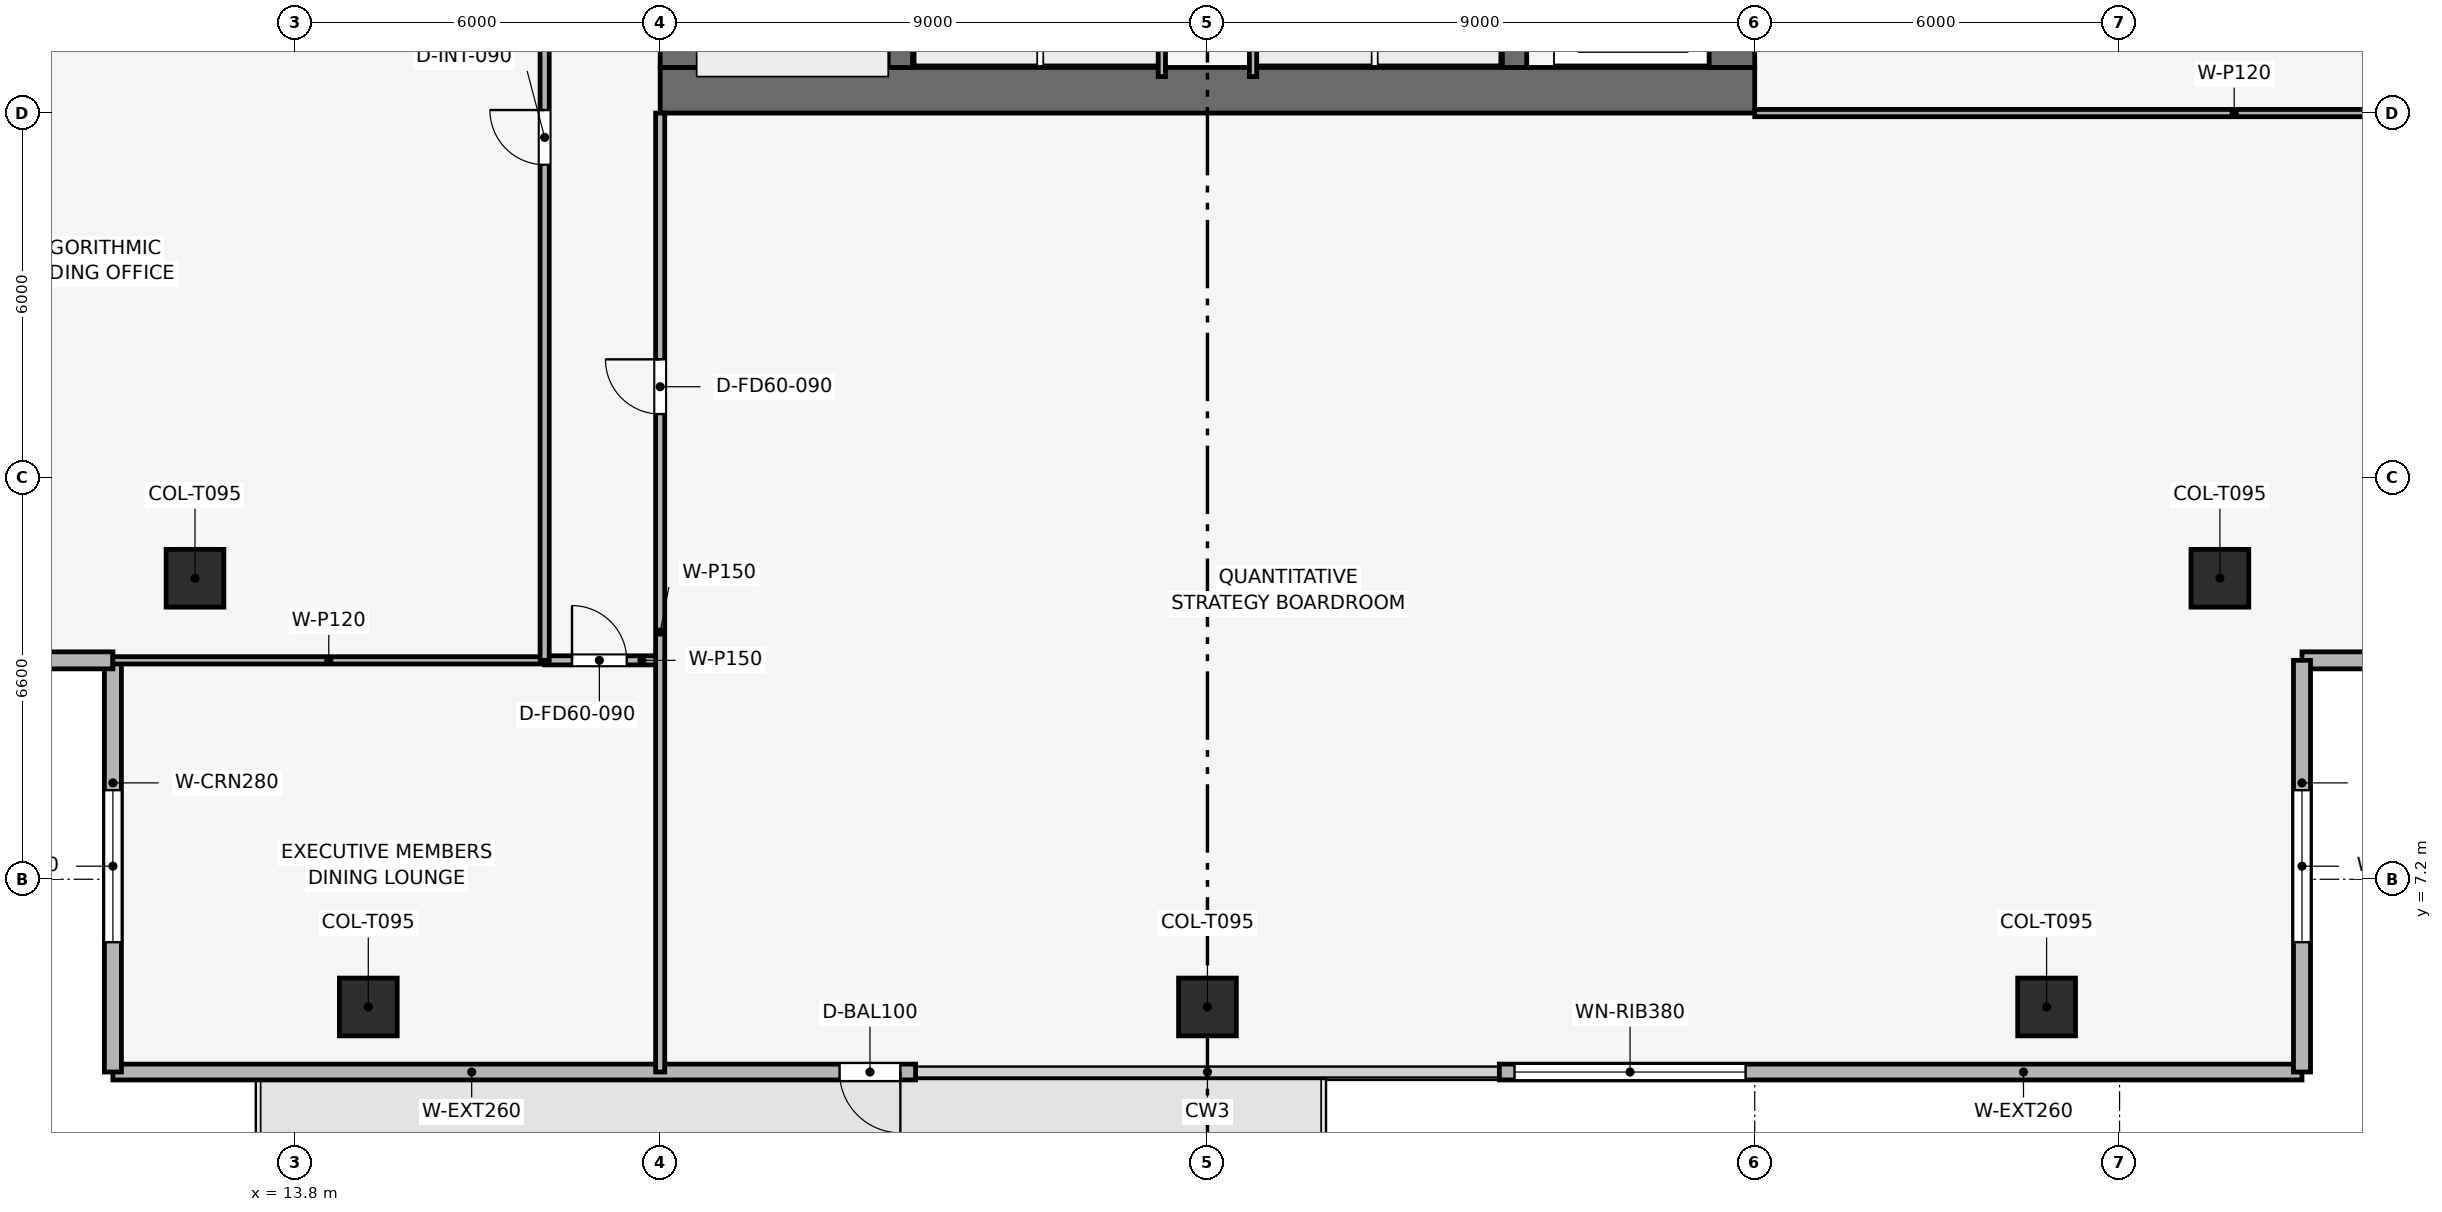
"""IFC4 building model, lengths in metres.
Left out: names, types, materials, properties, quantities, classifications, styles, units other than length and angle.
Written with IfcOpenShell. Run it as: python <this file> out.ifc"""

import sys

from ifc_helpers import new_model, si_unit, direction, frame, frame_2d, origin, origin_2d, place, context, subcontext, project, spatial, rectangle, extrude, element, fill, save


model = new_model("IFC4")
c1 = context("Model", 3, precision=1e-05, world=origin(), true_north=direction((0.0, 1.0)))
c2 = subcontext(c1, "Body", "Model", "MODEL_VIEW")
j1 = project(units=[si_unit("LENGTHUNIT", "METRE"), si_unit("PLANEANGLEUNIT", "RADIAN")], contexts=[c1])
p1 = place(None, origin())
s1 = spatial("IfcSite", under=j1, at=p1, CompositionType="ELEMENT")
p2 = place(p1, origin())
s2 = spatial("IfcBuilding", under=s1, at=p2, CompositionType="ELEMENT")
p3 = place(p2, frame((0.0, 0.0, 276.6)))
s3 = spatial("IfcBuildingStorey", under=s2, at=p3, CompositionType="ELEMENT", Elevation=276.6)
p4 = place(p3, frame((19.8, 20.175, 0.0), z_axis=(0.0, 0.0, 1.0), x_axis=(1.0, 0.0, 0.0)))
e1 = element("IfcWall", 1, at=p4, inside=s3, PredefinedType="SHEAR", context=c2, shape_type="SweptSolid", body=[
    extrude(rectangle(XDim=18.0, YDim=0.75, at=frame_2d((9.0, 0.0))), origin(), (0.0, 0.0, 1.0), 3.75),
])
p5 = place(p3, frame((20.175, 20.55, 0.0), z_axis=(0.0, 0.0, 1.0), x_axis=(0.0, 1.0, 0.0)))
e2 = element("IfcWall", 2, at=p5, inside=s3, PredefinedType="SHEAR", context=c2, shape_type="SweptSolid", body=[
    extrude(rectangle(XDim=16.5, YDim=0.75, at=frame_2d((8.25, 0.0))), origin(), (0.0, 0.0, 1.0), 3.75),
])
p6 = place(p5, frame((10.25, 0.0, 0.0)))
e3 = element("IfcOpeningElement", 3, at=p6, cuts=e2, PredefinedType="OPENING", context=c2, shape_type="SweptSolid", body=[
    extrude(rectangle(XDim=1.1, YDim=2.15, at=frame_2d((0.55, 1.075))), frame((0.0, 0.385, 0.0), z_axis=(0.0, -1.0, 0.0), x_axis=(1.0, 0.0, 0.0)), (0.0, 0.0, 1.0), 0.77),
])
p7 = place(p3, frame((37.425, 20.55, 0.0), z_axis=(0.0, 0.0, 1.0), x_axis=(0.0, 1.0, 0.0)))
e4 = element("IfcWall", 4, at=p7, inside=s3, PredefinedType="SHEAR", context=c2, shape_type="SweptSolid", body=[
    extrude(rectangle(XDim=16.5, YDim=0.75, at=frame_2d((8.25, 0.0))), origin(), (0.0, 0.0, 1.0), 3.75),
])
p8 = place(p7, frame((4.75, 0.0, 0.0)))
e5 = element("IfcOpeningElement", 5, at=p8, cuts=e4, PredefinedType="OPENING", context=c2, shape_type="SweptSolid", body=[
    extrude(rectangle(XDim=1.1, YDim=2.15, at=frame_2d((0.55, 1.075))), frame((0.0, 0.385, 0.0), z_axis=(0.0, -1.0, 0.0), x_axis=(1.0, 0.0, 0.0)), (0.0, 0.0, 1.0), 0.77),
])
for number, where, z_axis, x_axis in (
    (6, (23.75, 20.55, 0.0), (0.0, 0.0, 1.0), (0.0, 1.0, 0.0)),
    (7, (33.85, 20.55, 0.0), (0.0, 0.0, 1.0), (0.0, 1.0, 0.0)),
):
    element("IfcWall", number, at=place(p3, frame(where, z_axis=z_axis, x_axis=x_axis)), inside=s3, PredefinedType="SHEAR", context=c2, shape_type="SweptSolid", body=[
        extrude(rectangle(XDim=16.5, YDim=0.4, at=frame_2d((8.25, 0.0))), origin(), (0.0, 0.0, 1.0), 3.75),
    ])
for number, where, z_axis, x_axis in (
    (8, (15.0, 5.1, 0.003), (0.0, 0.0, 1.0), (1.0, 0.0, 0.0)),
    (9, (28.8, 5.1, 0.003), (0.0, 0.0, 1.0), (1.0, 0.0, 0.0)),
    (10, (42.6, 5.1, 0.003), (0.0, 0.0, 1.0), (1.0, 0.0, 0.0)),
    (11, (12.15, 12.15, 0.003), (0.0, 0.0, 1.0), (1.0, 0.0, 0.0)),
    (12, (45.45, 12.15, 0.003), (0.0, 0.0, 1.0), (1.0, 0.0, 0.0)),
):
    element("IfcColumn", number, at=place(p3, frame(where, z_axis=z_axis, x_axis=x_axis)), inside=s3, PredefinedType="COLUMN", context=c2, shape_type="SweptSolid", body=[
        extrude(rectangle(XDim=0.95, YDim=0.95, at=origin_2d()), origin(), (0.0, 0.0, 1.0), 3.494),
    ])
p9 = place(p3, frame((46.8, 4.03, 0.0), z_axis=(0.0, 0.0, 1.0), x_axis=(-1.0, 0.0, 0.0)))
e13 = element("IfcWall", 13, at=p9, inside=s3, PredefinedType="SOLIDWALL", context=c2, shape_type="SweptSolid", body=[
    extrude(rectangle(XDim=13.2, YDim=0.26, at=frame_2d((6.6, 0.0))), origin(), (0.0, 0.0, 1.0), 3.5),
])
p10 = place(p9, frame((9.15, 0.0, 0.9)))
e14 = element("IfcOpeningElement", 14, at=p10, cuts=e13, PredefinedType="OPENING", context=c2, shape_type="SweptSolid", body=[
    extrude(rectangle(XDim=3.8, YDim=1.9, at=frame_2d((1.9, 0.95))), frame((0.0, 0.14, 0.0), z_axis=(0.0, -1.0, 0.0), x_axis=(1.0, 0.0, 0.0)), (0.0, 0.0, 1.0), 0.28),
])
p11 = place(p3, frame((24.0, 4.03, 0.0), z_axis=(0.0, 0.0, 1.0), x_axis=(-1.0, 0.0, 0.0)))
e15 = element("IfcWall", 15, at=p11, inside=s3, PredefinedType="SOLIDWALL", context=c2, shape_type="SweptSolid", body=[
    extrude(rectangle(XDim=13.2, YDim=0.26, at=frame_2d((6.6, 0.0))), origin(), (0.0, 0.0, 1.0), 3.5),
])
p12 = place(p11, frame((0.25, 0.0, 0.0)))
e16 = element("IfcOpeningElement", 16, at=p12, cuts=e15, PredefinedType="OPENING", context=c2, shape_type="SweptSolid", body=[
    extrude(rectangle(XDim=1.0, YDim=2.2, at=frame_2d((0.5, 1.1))), frame((0.0, 0.14, 0.0), z_axis=(0.0, -1.0, 0.0), x_axis=(1.0, 0.0, 0.0)), (0.0, 0.0, 1.0), 0.28),
])
p13 = place(p3, frame((10.8, 4.03, 0.0), z_axis=(0.0, 0.0, 1.0), x_axis=(0.0, 1.0, 0.0)))
e17 = element("IfcWall", 17, at=p13, inside=s3, PredefinedType="SOLIDWALL", context=c2, shape_type="SweptSolid", body=[
    extrude(rectangle(XDim=6.77, YDim=0.28, at=frame_2d((3.385, 0.0))), origin(), (0.0, 0.0, 1.0), 3.5),
])
p14 = place(p13, frame((2.135, 0.0, 0.9)))
e18 = element("IfcOpeningElement", 18, at=p14, cuts=e17, PredefinedType="OPENING", context=c2, shape_type="SweptSolid", body=[
    extrude(rectangle(XDim=2.5, YDim=1.9, at=frame_2d((1.25, 0.95))), frame((0.0, 0.15, 0.0), z_axis=(0.0, -1.0, 0.0), x_axis=(1.0, 0.0, 0.0)), (0.0, 0.0, 1.0), 0.3),
])
p15 = place(p3, frame((10.8, 10.8, 0.0), z_axis=(0.0, 0.0, 1.0), x_axis=(-1.0, 0.0, 0.0)))
e19 = element("IfcWall", 19, at=p15, inside=s3, PredefinedType="SOLIDWALL", context=c2, shape_type="SweptSolid", body=[
    extrude(rectangle(XDim=6.77, YDim=0.28, at=frame_2d((3.385, 0.0))), origin(), (0.0, 0.0, 1.0), 3.5),
])
p16 = place(p15, frame((2.135, 0.0, 0.9)))
e20 = element("IfcOpeningElement", 20, at=p16, cuts=e19, PredefinedType="OPENING", context=c2, shape_type="SweptSolid", body=[
    extrude(rectangle(XDim=2.5, YDim=1.9, at=frame_2d((1.25, 0.95))), frame((0.0, 0.15, 0.0), z_axis=(0.0, -1.0, 0.0), x_axis=(1.0, 0.0, 0.0)), (0.0, 0.0, 1.0), 0.3),
])
p17 = place(p3, frame((53.57, 10.8, 0.0), z_axis=(0.0, 0.0, 1.0), x_axis=(-1.0, 0.0, 0.0)))
e21 = element("IfcWall", 21, at=p17, inside=s3, PredefinedType="SOLIDWALL", context=c2, shape_type="SweptSolid", body=[
    extrude(rectangle(XDim=6.77, YDim=0.28, at=frame_2d((3.385, 0.0))), origin(), (0.0, 0.0, 1.0), 3.5),
])
p18 = place(p17, frame((2.135, 0.0, 0.9)))
e22 = element("IfcOpeningElement", 22, at=p18, cuts=e21, PredefinedType="OPENING", context=c2, shape_type="SweptSolid", body=[
    extrude(rectangle(XDim=2.5, YDim=1.9, at=frame_2d((1.25, 0.95))), frame((0.0, 0.15, 0.0), z_axis=(0.0, -1.0, 0.0), x_axis=(1.0, 0.0, 0.0)), (0.0, 0.0, 1.0), 0.3),
])
p19 = place(p3, frame((46.8, 10.8, 0.0), z_axis=(0.0, 0.0, 1.0), x_axis=(0.0, -1.0, 0.0)))
e23 = element("IfcWall", 23, at=p19, inside=s3, PredefinedType="SOLIDWALL", context=c2, shape_type="SweptSolid", body=[
    extrude(rectangle(XDim=6.77, YDim=0.28, at=frame_2d((3.385, 0.0))), origin(), (0.0, 0.0, 1.0), 3.5),
])
p20 = place(p19, frame((2.135, 0.0, 0.9)))
e24 = element("IfcOpeningElement", 24, at=p20, cuts=e23, PredefinedType="OPENING", context=c2, shape_type="SweptSolid", body=[
    extrude(rectangle(XDim=2.5, YDim=1.9, at=frame_2d((1.25, 0.95))), frame((0.0, 0.15, 0.0), z_axis=(0.0, -1.0, 0.0), x_axis=(1.0, 0.0, 0.0)), (0.0, 0.0, 1.0), 0.3),
])
p21 = place(p3, frame((28.05, 20.4, 0.0), z_axis=(0.0, 0.0, 1.0), x_axis=(0.0, 1.0, 0.0)))
e25 = element("IfcWall", 25, at=p21, inside=s3, PredefinedType="PARTITIONING", context=c2, shape_type="SweptSolid", body=[
    extrude(rectangle(XDim=8.15, YDim=0.12, at=frame_2d((4.075, 0.0))), origin(), (0.0, 0.0, 1.0), 3.5),
])
p22 = place(p3, frame((29.55, 20.4, 0.0), z_axis=(0.0, 0.0, 1.0), x_axis=(0.0, 1.0, 0.0)))
e26 = element("IfcWall", 26, at=p22, inside=s3, PredefinedType="PARTITIONING", context=c2, shape_type="SweptSolid", body=[
    extrude(rectangle(XDim=2.75, YDim=0.12, at=frame_2d((1.375, 0.0))), origin(), (0.0, 0.0, 1.0), 3.5),
])
p23 = place(p3, frame((10.8, 10.8, 0.0), z_axis=(0.0, 0.0, 1.0), x_axis=(1.0, 0.0, 0.0)))
e27 = element("IfcWall", 27, at=p23, inside=s3, PredefinedType="PARTITIONING", context=c2, shape_type="SweptSolid", body=[
    extrude(rectangle(XDim=7.1, YDim=0.12, at=frame_2d((3.55, 0.0))), origin(), (0.0, 0.0, 1.0), 3.085),
])
p24 = place(p3, frame((17.9, 10.8, 0.0), z_axis=(0.0, 0.0, 1.0), x_axis=(1.0, 0.0, 0.0)))
e28 = element("IfcWall", 28, at=p24, inside=s3, PredefinedType="PARTITIONING", context=c2, shape_type="SweptSolid", body=[
    extrude(rectangle(XDim=1.9, YDim=0.15, at=frame_2d((0.95, 0.0))), origin(), (0.0, 0.0, 1.0), 3.5),
])
p25 = place(p24, frame((0.45, 0.0, 0.0)))
e29 = element("IfcOpeningElement", 29, at=p25, cuts=e28, PredefinedType="OPENING", context=c2, shape_type="SweptSolid", body=[
    extrude(rectangle(XDim=0.9, YDim=2.1, at=frame_2d((0.45, 1.05))), frame((0.0, 0.085, 0.0), z_axis=(0.0, -1.0, 0.0), x_axis=(1.0, 0.0, 0.0)), (0.0, 0.0, 1.0), 0.17),
])
p26 = place(p3, frame((19.8, 4.03, 0.0), z_axis=(0.0, 0.0, 1.0), x_axis=(0.0, 1.0, 0.0)))
e30 = element("IfcWall", 30, at=p26, inside=s3, PredefinedType="PARTITIONING", context=c2, shape_type="SweptSolid", body=[
    extrude(rectangle(XDim=15.77, YDim=0.15, at=frame_2d((7.885, 0.0))), origin(), (0.0, 0.0, 1.0), 3.085),
])
p27 = place(p26, frame((10.82, 0.0, 0.0)))
e31 = element("IfcOpeningElement", 31, at=p27, cuts=e30, PredefinedType="OPENING", context=c2, shape_type="SweptSolid", body=[
    extrude(rectangle(XDim=0.9, YDim=2.1, at=frame_2d((0.45, 1.05))), frame((0.0, 0.085, 0.0), z_axis=(0.0, -1.0, 0.0), x_axis=(1.0, 0.0, 0.0)), (0.0, 0.0, 1.0), 0.17),
])
p28 = place(p3, frame((37.8, 19.8, 0.0), z_axis=(0.0, 0.0, 1.0), x_axis=(1.0, 0.0, 0.0)))
e32 = element("IfcWall", 32, at=p28, inside=s3, PredefinedType="PARTITIONING", context=c2, shape_type="SweptSolid", body=[
    extrude(rectangle(XDim=15.77, YDim=0.12, at=frame_2d((7.885, 0.0))), origin(), (0.0, 0.0, 1.0), 3.085),
])
p29 = place(p3, frame((17.9, 10.8, 0.0), z_axis=(0.0, 0.0, 1.0), x_axis=(0.0, 1.0, 0.0)))
e33 = element("IfcWall", 33, at=p29, inside=s3, PredefinedType="PARTITIONING", context=c2, shape_type="SweptSolid", body=[
    extrude(rectangle(XDim=28.9, YDim=0.15, at=frame_2d((14.45, 0.0))), origin(), (0.0, 0.0, 1.0), 3.085),
])
p30 = place(p29, frame((8.15, 0.0, 0.0)))
e34 = element("IfcOpeningElement", 34, at=p30, cuts=e33, PredefinedType="OPENING", context=c2, shape_type="SweptSolid", body=[
    extrude(rectangle(XDim=0.9, YDim=2.1, at=frame_2d((0.45, 1.05))), frame((0.0, 0.085, 0.0), z_axis=(0.0, -1.0, 0.0), x_axis=(1.0, 0.0, 0.0)), (0.0, 0.0, 1.0), 0.17),
])
p31 = place(p29, frame((18.15, 0.0, 0.0)))
e35 = element("IfcOpeningElement", 35, at=p31, cuts=e33, PredefinedType="OPENING", context=c2, shape_type="SweptSolid", body=[
    extrude(rectangle(XDim=0.9, YDim=2.1, at=frame_2d((0.45, 1.05))), frame((0.0, 0.085, 0.0), z_axis=(0.0, -1.0, 0.0), x_axis=(1.0, 0.0, 0.0)), (0.0, 0.0, 1.0), 0.17),
])
p32 = place(p29, frame((21.05, 0.0, 0.0)))
e36 = element("IfcOpeningElement", 36, at=p32, cuts=e33, PredefinedType="OPENING", context=c2, shape_type="SweptSolid", body=[
    extrude(rectangle(XDim=0.9, YDim=2.1, at=frame_2d((0.45, 1.05))), frame((0.0, 0.085, 0.0), z_axis=(0.0, -1.0, 0.0), x_axis=(1.0, 0.0, 0.0)), (0.0, 0.0, 1.0), 0.17),
])
p33 = place(p29, frame((23.8, 0.0, 0.0)))
e37 = element("IfcOpeningElement", 37, at=p33, cuts=e33, PredefinedType="OPENING", context=c2, shape_type="SweptSolid", body=[
    extrude(rectangle(XDim=0.95, YDim=2.1, at=frame_2d((0.475, 1.05))), frame((0.0, 0.085, 0.0), z_axis=(0.0, -1.0, 0.0), x_axis=(1.0, 0.0, 0.0)), (0.0, 0.0, 1.0), 0.17),
])
p34 = place(p29, frame((26.8, 0.0, 0.0)))
e38 = element("IfcOpeningElement", 38, at=p34, cuts=e33, PredefinedType="OPENING", context=c2, shape_type="SweptSolid", body=[
    extrude(rectangle(XDim=0.9, YDim=2.1, at=frame_2d((0.45, 1.05))), frame((0.0, 0.085, 0.0), z_axis=(0.0, -1.0, 0.0), x_axis=(1.0, 0.0, 0.0)), (0.0, 0.0, 1.0), 0.17),
])
p35 = place(p12, origin())
e39 = element("IfcDoor", 39, at=p35, inside=s3, OperationType="SINGLE_SWING_LEFT", PredefinedType="DOOR", context=c2, shape_type="SweptSolid", body=[
    extrude(rectangle(XDim=1.0, YDim=2.2, at=frame_2d((0.5, 1.1))), frame((0.0, 0.025, 0.0), z_axis=(0.0, -1.0, 0.0), x_axis=(1.0, 0.0, 0.0)), (0.0, 0.0, 1.0), 0.05),
])
fill(e16, e39)
p36 = place(p10, origin())
e40 = element("IfcWindow", 40, at=p36, inside=s3, PartitioningType="SINGLE_PANEL", PredefinedType="WINDOW", context=c2, shape_type="SweptSolid", body=[
    extrude(rectangle(XDim=3.8, YDim=1.9, at=frame_2d((1.9, 0.95))), frame((0.0, 0.03, 0.0), z_axis=(0.0, -1.0, 0.0), x_axis=(1.0, 0.0, 0.0)), (0.0, 0.0, 1.0), 0.06),
])
fill(e14, e40)
p37 = place(p14, origin())
e41 = element("IfcWindow", 41, at=p37, inside=s3, PartitioningType="SINGLE_PANEL", PredefinedType="WINDOW", context=c2, shape_type="SweptSolid", body=[
    extrude(rectangle(XDim=2.5, YDim=1.9, at=frame_2d((1.25, 0.95))), frame((0.0, 0.03, 0.0), z_axis=(0.0, -1.0, 0.0), x_axis=(1.0, 0.0, 0.0)), (0.0, 0.0, 1.0), 0.06),
])
fill(e18, e41)
p38 = place(p20, origin())
e42 = element("IfcWindow", 42, at=p38, inside=s3, PartitioningType="SINGLE_PANEL", PredefinedType="WINDOW", context=c2, shape_type="SweptSolid", body=[
    extrude(rectangle(XDim=2.5, YDim=1.9, at=frame_2d((1.25, 0.95))), frame((0.0, 0.03, 0.0), z_axis=(0.0, -1.0, 0.0), x_axis=(1.0, 0.0, 0.0)), (0.0, 0.0, 1.0), 0.06),
])
fill(e24, e42)
p39 = place(p25, origin())
e43 = element("IfcDoor", 43, at=p39, inside=s3, OperationType="SINGLE_SWING_LEFT", PredefinedType="DOOR", context=c2, shape_type="SweptSolid", body=[
    extrude(rectangle(XDim=0.9, YDim=2.1, at=frame_2d((0.45, 1.05))), frame((0.0, 0.025, 0.0), z_axis=(0.0, -1.0, 0.0), x_axis=(1.0, 0.0, 0.0)), (0.0, 0.0, 1.0), 0.05),
])
fill(e29, e43)
p40 = place(p27, origin())
e44 = element("IfcDoor", 44, at=p40, inside=s3, OperationType="SINGLE_SWING_RIGHT", PredefinedType="DOOR", context=c2, shape_type="SweptSolid", body=[
    extrude(rectangle(XDim=0.9, YDim=2.1, at=frame_2d((0.45, 1.05))), frame((0.0, 0.025, 0.0), z_axis=(0.0, -1.0, 0.0), x_axis=(1.0, 0.0, 0.0)), (0.0, 0.0, 1.0), 0.05),
])
fill(e31, e44)
p41 = place(p30, origin())
e45 = element("IfcDoor", 45, at=p41, inside=s3, OperationType="SINGLE_SWING_RIGHT", PredefinedType="DOOR", context=c2, shape_type="SweptSolid", body=[
    extrude(rectangle(XDim=0.9, YDim=2.1, at=frame_2d((0.45, 1.05))), frame((0.0, 0.025, 0.0), z_axis=(0.0, -1.0, 0.0), x_axis=(1.0, 0.0, 0.0)), (0.0, 0.0, 1.0), 0.05),
])
fill(e34, e45)
save(model, sys.argv[1])
